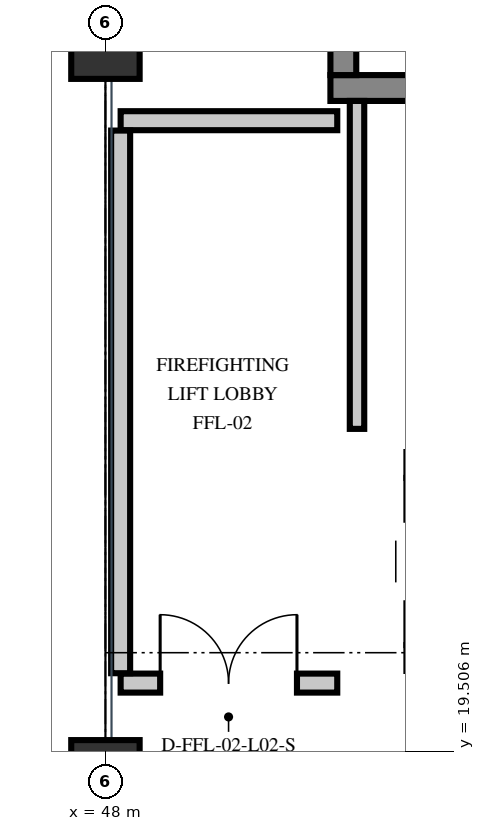
"""IFC4 building model, lengths in metres.
Left out: names, types, materials, properties, quantities, classifications, styles, units other than length and angle.
Written with IfcOpenShell. Run it as: python <this file> out.ifc"""

import sys

from ifc_helpers import new_model, si_unit, direction, frame, frame_2d, origin, origin_2d, place, context, subcontext, project, spatial, rectangle, extrude, element, fill, save


model = new_model("IFC4")
c1 = context("Model", 3, precision=1e-05, world=origin(), true_north=direction((0.0, 1.0)))
c2 = subcontext(c1, "Body", "Model", "MODEL_VIEW")
j1 = project(units=[si_unit("LENGTHUNIT", "METRE"), si_unit("PLANEANGLEUNIT", "RADIAN")], contexts=[c1])
p1 = place(None, origin())
s1 = spatial("IfcSite", under=j1, at=p1, CompositionType="ELEMENT")
p2 = place(p1, origin())
s2 = spatial("IfcBuilding", under=s1, at=p2, CompositionType="ELEMENT")
p3 = place(p2, frame((0.0, 0.0, 10.2)))
s3 = spatial("IfcBuildingStorey", under=s2, at=p3, CompositionType="ELEMENT", Elevation=10.2)
for number, where, z_axis, x_axis in (
    (1, (48.0, 19.2, 0.0), (0.0, 0.0, 1.0), (1.0, 0.0, 0.0)),
    (2, (48.0, 28.8, 0.0), (0.0, 0.0, 1.0), (1.0, 0.0, 0.0)),
):
    element("IfcColumn", number, at=place(p3, frame(where, z_axis=z_axis, x_axis=x_axis)), inside=s3, PredefinedType="COLUMN", context=c2, shape_type="SweptSolid", body=[
        extrude(rectangle(XDim=0.9, YDim=0.9, at=origin_2d()), origin(), (0.0, 0.0, 1.0), 4.8),
    ])
p4 = place(p3, frame((50.96, 28.23, 0.0), z_axis=(0.0, 0.0, 1.0), x_axis=(1.0, 0.0, 0.0)))
e3 = element("IfcWall", 3, at=p4, inside=s3, PredefinedType="SHEAR", context=c2, shape_type="SweptSolid", body=[
    extrude(rectangle(XDim=5.18, YDim=0.34, at=frame_2d((2.59, 0.0))), origin(), (0.0, 0.0, 1.0), 4.515),
])
p5 = place(p3, frame((51.13, 28.4, 0.0), z_axis=(0.0, 0.0, 1.0), x_axis=(0.0, 1.0, 0.0)))
e4 = element("IfcWall", 4, at=p5, inside=s3, PredefinedType="SHEAR", context=c2, shape_type="SweptSolid", body=[
    extrude(rectangle(XDim=8.8, YDim=0.34, at=frame_2d((4.4, 0.0))), origin(), (0.0, 0.0, 1.0), 4.515),
])
p6 = place(p5, frame((0.45, 0.0, 0.0)))
e5 = element("IfcOpeningElement", 5, at=p6, cuts=e4, PredefinedType="OPENING", context=c2, shape_type="SweptSolid", body=[
    extrude(rectangle(XDim=1.35, YDim=2.2, at=frame_2d((0.675, 1.1))), frame((0.0, 0.182, 0.0), z_axis=(0.0, -1.0, 0.0), x_axis=(1.0, 0.0, 0.0)), (0.0, 0.0, 1.0), 0.364),
])
p7 = place(p3, frame((48.2, 20.4, 0.0), z_axis=(0.0, 0.0, 1.0), x_axis=(1.0, 0.0, 0.0)))
e6 = element("IfcWall", 6, at=p7, inside=s3, PredefinedType="PARTITIONING", context=c2, shape_type="SweptSolid", body=[
    extrude(rectangle(XDim=2.85, YDim=0.25, at=frame_2d((1.425, 0.0))), origin(), (0.0, 0.0, 1.0), 3.455),
])
p8 = place(p7, frame((0.52, 0.0, 0.0)))
e7 = element("IfcOpeningElement", 7, at=p8, cuts=e6, PredefinedType="OPENING", context=c2, shape_type="SweptSolid", body=[
    extrude(rectangle(XDim=1.8, YDim=2.25, at=frame_2d((0.9, 1.125))), frame((0.0, 0.137, 0.0), z_axis=(0.0, -1.0, 0.0), x_axis=(1.0, 0.0, 0.0)), (0.0, 0.0, 1.0), 0.274),
])
p9 = place(p3, frame((48.2, 27.8, 0.0), z_axis=(0.0, 0.0, 1.0), x_axis=(1.0, 0.0, 0.0)))
e8 = element("IfcWall", 8, at=p9, inside=s3, PredefinedType="PARTITIONING", context=c2, shape_type="SweptSolid", body=[
    extrude(rectangle(XDim=2.85, YDim=0.25, at=frame_2d((1.425, 0.0))), origin(), (0.0, 0.0, 1.0), 3.455),
])
p10 = place(p3, frame((48.2, 20.53, 0.0), z_axis=(0.0, 0.0, 1.0), x_axis=(0.0, 1.0, 0.0)))
e9 = element("IfcWall", 9, at=p10, inside=s3, PredefinedType="PARTITIONING", context=c2, shape_type="SweptSolid", body=[
    extrude(rectangle(XDim=7.14, YDim=0.25, at=frame_2d((3.57, 0.0))), origin(), (0.0, 0.0, 1.0), 3.455),
])
p11 = place(p3, frame((51.31, 23.745, 0.0), z_axis=(0.0, 0.0, 1.0), x_axis=(0.0, 1.0, 0.0)))
e10 = element("IfcWall", 10, at=p11, inside=s3, PredefinedType="PARTITIONING", context=c2, shape_type="SweptSolid", body=[
    extrude(rectangle(XDim=4.315, YDim=0.19, at=frame_2d((2.158, 0.0))), origin(), (0.0, 0.0, 1.0), 4.515),
])
p12 = place(p8, origin())
e11 = element("IfcDoor", 11, at=p12, inside=s3, OperationType="DOUBLE_DOOR_SINGLE_SWING", PredefinedType="DOOR", context=c2, shape_type="SweptSolid", body=[
    extrude(rectangle(XDim=1.8, YDim=2.25, at=frame_2d((0.9, 1.125))), frame((0.0, 0.025, 0.0), z_axis=(0.0, -1.0, 0.0), x_axis=(1.0, 0.0, 0.0)), (0.0, 0.0, 1.0), 0.05),
])
fill(e7, e11)
save(model, sys.argv[1])
